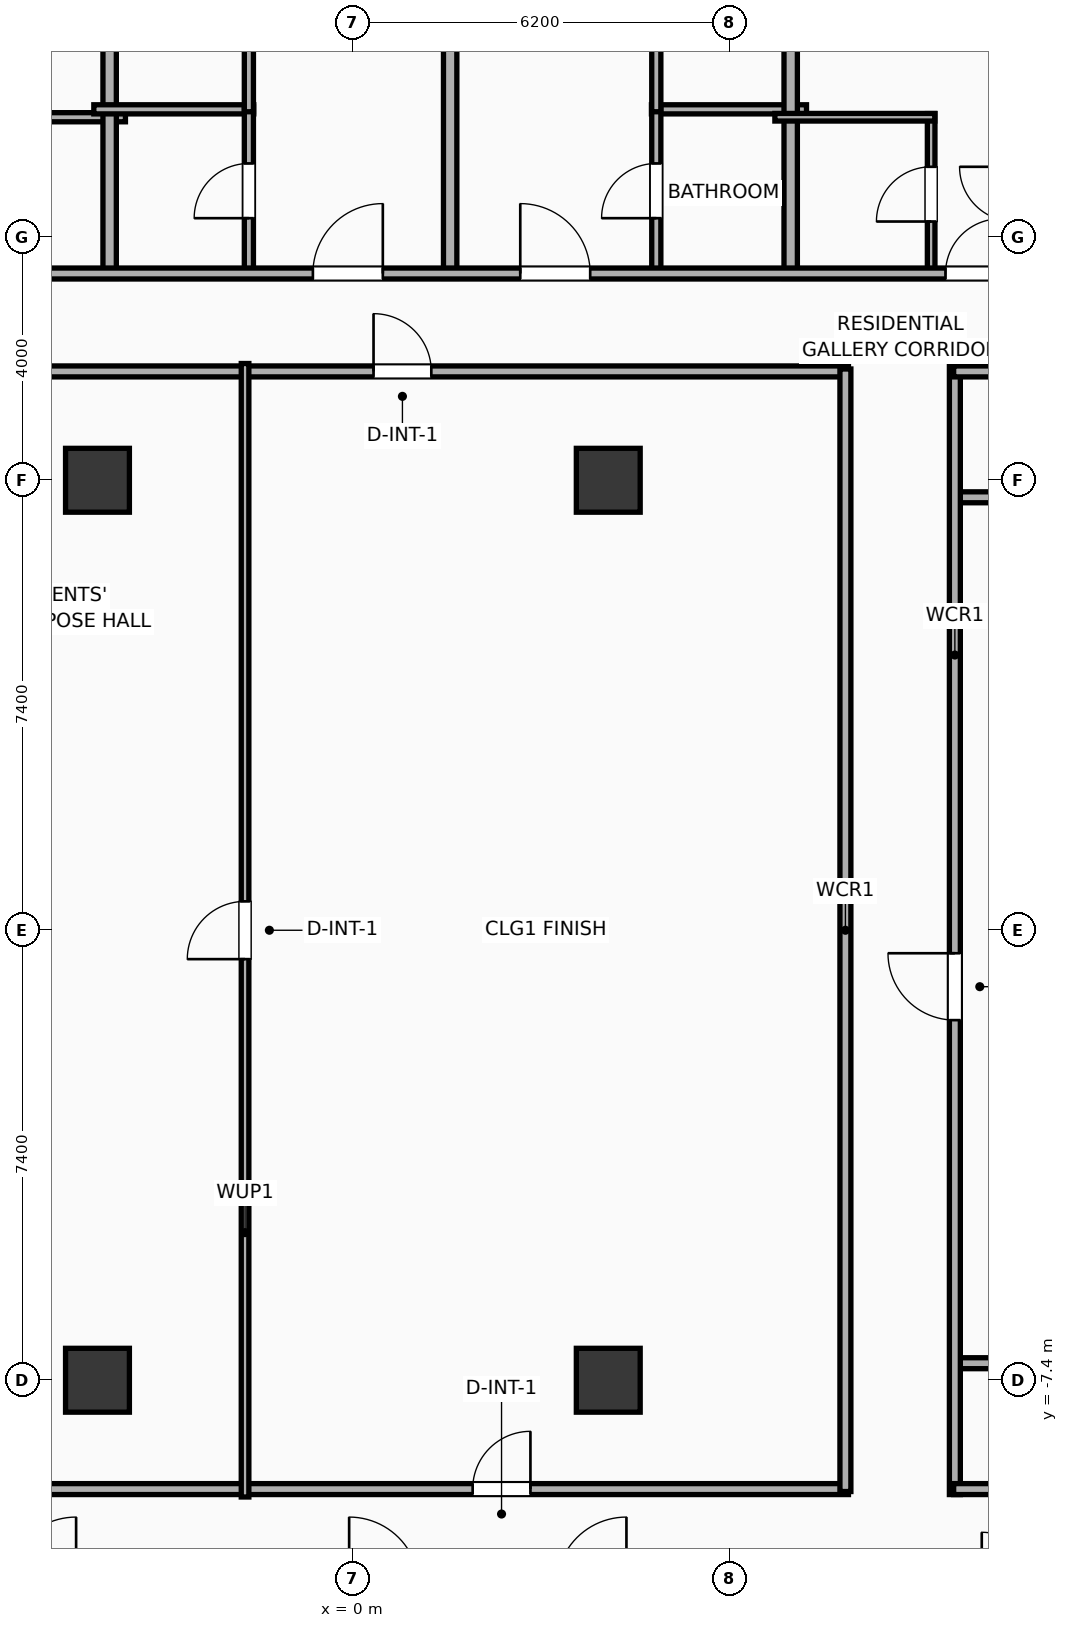
"""IFC4 building model, lengths in metres.
Left out: names, types, materials, properties, quantities, classifications, styles, units other than length and angle.
Written with IfcOpenShell. Run it as: python <this file> out.ifc"""

import sys

from ifc_helpers import new_model, si_unit, direction, frame, frame_2d, origin, origin_2d, place, context, subcontext, project, spatial, rectangle, extrude, element, fill, save


model = new_model("IFC4")
c1 = context("Model", 3, precision=1e-05, world=origin(), true_north=direction((0.0, 1.0)))
c2 = subcontext(c1, "Body", "Model", "MODEL_VIEW")
j1 = project(units=[si_unit("LENGTHUNIT", "METRE"), si_unit("PLANEANGLEUNIT", "RADIAN")], contexts=[c1])
p1 = place(None, origin())
s1 = spatial("IfcSite", under=j1, at=p1, CompositionType="ELEMENT")
p2 = place(p1, origin())
s2 = spatial("IfcBuilding", under=s1, at=p2, CompositionType="ELEMENT")
p3 = place(p2, frame((0.0, 0.0, 29.9)))
s3 = spatial("IfcBuildingStorey", under=s2, at=p3, CompositionType="ELEMENT", Elevation=29.9)
for number, where, z_axis, x_axis in (
    (1, (-4.2, -7.4, 0.0), (0.0, 0.0, 1.0), (1.0, 0.0, 0.0)),
    (2, (-4.2, 7.4, 0.0), (0.0, 0.0, 1.0), (1.0, 0.0, 0.0)),
    (3, (4.2, -7.4, 0.0), (0.0, 0.0, 1.0), (1.0, 0.0, 0.0)),
    (4, (4.2, 7.4, 0.0), (0.0, 0.0, 1.0), (1.0, 0.0, 0.0)),
):
    element("IfcColumn", number, at=place(p3, frame(where, z_axis=z_axis, x_axis=x_axis)), inside=s3, PredefinedType="COLUMN", context=c2, shape_type="SweptSolid", body=[
        extrude(rectangle(XDim=1.05, YDim=1.05, at=origin_2d()), origin(), (0.0, 0.0, 1.0), 3.9),
    ])
for number, where, z_axis, x_axis in (
    (5, (9.88, 7.12, 0.0), (0.0, 0.0, 1.0), (1.0, 0.0, 0.0)),
    (6, (9.88, -7.12, 0.0), (0.0, 0.0, 1.0), (1.0, 0.0, 0.0)),
):
    element("IfcWall", number, at=place(p3, frame(where, z_axis=z_axis, x_axis=x_axis)), inside=s3, PredefinedType="PARTITIONING", context=c2, shape_type="SweptSolid", body=[
        extrude(rectangle(XDim=2.27, YDim=0.18, at=frame_2d((1.135, 0.0))), origin(), (0.0, 0.0, 1.0), 2.94),
    ])
p4 = place(p3, frame((9.9, -9.28, 0.0), z_axis=(0.0, 0.0, 1.0), x_axis=(0.0, 1.0, 0.0)))
e7 = element("IfcWall", 7, at=p4, inside=s3, PredefinedType="PARTITIONING", context=c2, shape_type="SweptSolid", body=[
    extrude(rectangle(XDim=18.56, YDim=0.18, at=frame_2d((9.28, 0.0))), origin(), (0.0, 0.0, 1.0), 3.65),
])
p5 = place(p4, frame((7.802, 0.0, 0.0)))
e8 = element("IfcOpeningElement", 8, at=p5, cuts=e7, PredefinedType="OPENING", context=c2, shape_type="SweptSolid", body=[
    extrude(rectangle(XDim=1.1, YDim=2.05, at=frame_2d((0.55, 1.025))), frame((0.0, 0.1, 0.0), z_axis=(0.0, -1.0, 0.0), x_axis=(1.0, 0.0, 0.0)), (0.0, 0.0, 1.0), 0.2),
])
p6 = place(p3, frame((9.88, 9.19, 0.0), z_axis=(0.0, 0.0, 1.0), x_axis=(1.0, 0.0, 0.0)))
e9 = element("IfcWall", 9, at=p6, inside=s3, PredefinedType="PARTITIONING", context=c2, shape_type="SweptSolid", body=[
    extrude(rectangle(XDim=16.33, YDim=0.18, at=frame_2d((8.165, 0.0))), origin(), (0.0, 0.0, 1.0), 3.65),
])
p7 = place(p6, frame((13.99, 0.0, 0.0)))
e10 = element("IfcOpeningElement", 10, at=p7, cuts=e9, PredefinedType="OPENING", context=c2, shape_type="SweptSolid", body=[
    extrude(rectangle(XDim=0.9, YDim=2.05, at=frame_2d((0.45, 1.025))), frame((0.0, 0.1, 0.0), z_axis=(0.0, -1.0, 0.0), x_axis=(1.0, 0.0, 0.0)), (0.0, 0.0, 1.0), 0.2),
])
p8 = place(p3, frame((9.88, -9.19, 0.0), z_axis=(0.0, 0.0, 1.0), x_axis=(1.0, 0.0, 0.0)))
e11 = element("IfcWall", 11, at=p8, inside=s3, PredefinedType="PARTITIONING", context=c2, shape_type="SweptSolid", body=[
    extrude(rectangle(XDim=16.33, YDim=0.18, at=frame_2d((8.165, 0.0))), origin(), (0.0, 0.0, 1.0), 3.65),
])
p9 = place(p3, frame((-8.15, 9.19, 0.0), z_axis=(0.0, 0.0, 1.0), x_axis=(1.0, 0.0, 0.0)))
e12 = element("IfcWall", 12, at=p9, inside=s3, PredefinedType="PARTITIONING", context=c2, shape_type="SweptSolid", body=[
    extrude(rectangle(XDim=16.3, YDim=0.18, at=frame_2d((8.15, 0.0))), origin(), (0.0, 0.0, 1.0), 3.65),
])
p10 = place(p9, frame((8.49, 0.0, 0.0)))
e13 = element("IfcOpeningElement", 13, at=p10, cuts=e12, PredefinedType="OPENING", context=c2, shape_type="SweptSolid", body=[
    extrude(rectangle(XDim=0.95, YDim=2.05, at=frame_2d((0.475, 1.025))), frame((0.0, 0.1, 0.0), z_axis=(0.0, -1.0, 0.0), x_axis=(1.0, 0.0, 0.0)), (0.0, 0.0, 1.0), 0.2),
])
p11 = place(p3, frame((-8.15, -9.19, 0.0), z_axis=(0.0, 0.0, 1.0), x_axis=(1.0, 0.0, 0.0)))
e14 = element("IfcWall", 14, at=p11, inside=s3, PredefinedType="PARTITIONING", context=c2, shape_type="SweptSolid", body=[
    extrude(rectangle(XDim=16.3, YDim=0.18, at=frame_2d((8.15, 0.0))), origin(), (0.0, 0.0, 1.0), 3.65),
])
p12 = place(p11, frame((1.13, 0.0, 0.0)))
e15 = element("IfcOpeningElement", 15, at=p12, cuts=e14, PredefinedType="OPENING", context=c2, shape_type="SweptSolid", body=[
    extrude(rectangle(XDim=1.0, YDim=2.05, at=frame_2d((0.5, 1.025))), frame((0.0, 0.1, 0.0), z_axis=(0.0, -1.0, 0.0), x_axis=(1.0, 0.0, 0.0)), (0.0, 0.0, 1.0), 0.2),
])
p13 = place(p11, frame((10.12, 0.0, 0.0)))
e16 = element("IfcOpeningElement", 16, at=p13, cuts=e14, PredefinedType="OPENING", context=c2, shape_type="SweptSolid", body=[
    extrude(rectangle(XDim=0.95, YDim=2.05, at=frame_2d((0.475, 1.025))), frame((0.0, 0.1, 0.0), z_axis=(0.0, -1.0, 0.0), x_axis=(1.0, 0.0, 0.0)), (0.0, 0.0, 1.0), 0.2),
])
p14 = place(p3, frame((8.1, -9.23, 0.0), z_axis=(0.0, 0.0, 1.0), x_axis=(0.0, 1.0, 0.0)))
e17 = element("IfcWall", 17, at=p14, inside=s3, PredefinedType="PARTITIONING", context=c2, shape_type="SweptSolid", body=[
    extrude(rectangle(XDim=18.46, YDim=0.18, at=frame_2d((9.23, 0.0))), origin(), (0.0, 0.0, 1.0), 3.65),
])
p15 = place(p3, frame((-1.773, -9.32, 0.0), z_axis=(0.0, 0.0, 1.0), x_axis=(0.0, 1.0, 0.0)))
e18 = element("IfcWall", 18, at=p15, inside=s3, PredefinedType="PARTITIONING", context=c2, shape_type="SweptSolid", body=[
    extrude(rectangle(XDim=18.64, YDim=0.125, at=frame_2d((9.32, 0.0))), origin(), (0.0, 0.0, 1.0), 3.65),
])
p16 = place(p15, frame((8.845, 0.0, 0.0)))
e19 = element("IfcOpeningElement", 19, at=p16, cuts=e18, PredefinedType="OPENING", context=c2, shape_type="SweptSolid", body=[
    extrude(rectangle(XDim=0.95, YDim=2.05, at=frame_2d((0.475, 1.025))), frame((0.0, 0.073, 0.0), z_axis=(0.0, -1.0, 0.0), x_axis=(1.0, 0.0, 0.0)), (0.0, 0.0, 1.0), 0.145),
])
p17 = place(p3, frame((-5.983, 13.37, 0.0), z_axis=(0.0, 0.0, 1.0), x_axis=(1.0, 0.0, 0.0)))
e20 = element("IfcWall", 20, at=p17, inside=s3, PredefinedType="PLUMBINGWALL", context=c2, shape_type="SweptSolid", body=[
    extrude(rectangle(XDim=2.243, YDim=0.15, at=frame_2d((1.122, 0.0))), origin(), (0.0, 0.0, 1.0), 3.65),
])
p18 = place(p3, frame((-4.0, 10.72, 0.0), z_axis=(0.0, 0.0, 1.0), x_axis=(0.0, 1.0, 0.0)))
e21 = element("IfcWall", 21, at=p18, inside=s3, PredefinedType="PARTITIONING", context=c2, shape_type="SweptSolid", body=[
    extrude(rectangle(XDim=11.49, YDim=0.22, at=frame_2d((5.745, 0.0))), origin(), (0.0, 0.0, 1.0), 3.65),
])
p19 = place(p3, frame((-4.26, 13.5, 0.0), z_axis=(0.0, 0.0, 1.0), x_axis=(1.0, 0.0, 0.0)))
e22 = element("IfcWall", 22, at=p19, inside=s3, PredefinedType="PLUMBINGWALL", context=c2, shape_type="SweptSolid", body=[
    extrude(rectangle(XDim=2.63, YDim=0.15, at=frame_2d((1.315, 0.0))), origin(), (0.0, 0.0, 1.0), 3.65),
])
p20 = place(p3, frame((-1.71, 10.78, 0.0), z_axis=(0.0, 0.0, 1.0), x_axis=(0.0, 1.0, 0.0)))
e23 = element("IfcWall", 23, at=p20, inside=s3, PredefinedType="PLUMBINGWALL", context=c2, shape_type="SweptSolid", body=[
    extrude(rectangle(XDim=2.76, YDim=0.15, at=frame_2d((1.38, 0.0))), origin(), (0.0, 0.0, 1.0), 3.65),
])
p21 = place(p20, frame((0.93, 0.0, 0.0)))
e24 = element("IfcOpeningElement", 24, at=p21, cuts=e23, PredefinedType="OPENING", context=c2, shape_type="SweptSolid", body=[
    extrude(rectangle(XDim=0.9, YDim=2.05, at=frame_2d((0.45, 1.025))), frame((0.0, 0.085, 0.0), z_axis=(0.0, -1.0, 0.0), x_axis=(1.0, 0.0, 0.0)), (0.0, 0.0, 1.0), 0.17),
])
p22 = place(p3, frame((-1.71, 13.46, 0.0), z_axis=(0.0, 0.0, 1.0), x_axis=(0.0, 1.0, 0.0)))
e25 = element("IfcWall", 25, at=p22, inside=s3, PredefinedType="PLUMBINGWALL", context=c2, shape_type="SweptSolid", body=[
    extrude(rectangle(XDim=8.798, YDim=0.15, at=frame_2d((4.399, 0.0))), origin(), (0.0, 0.0, 1.0), 3.65),
])
p23 = place(p22, frame((3.949, 0.0, 0.0)))
e26 = element("IfcOpeningElement", 26, at=p23, cuts=e25, PredefinedType="OPENING", context=c2, shape_type="SweptSolid", body=[
    extrude(rectangle(XDim=0.9, YDim=2.05, at=frame_2d((0.45, 1.025))), frame((0.0, 0.085, 0.0), z_axis=(0.0, -1.0, 0.0), x_axis=(1.0, 0.0, 0.0)), (0.0, 0.0, 1.0), 0.17),
])
p24 = place(p3, frame((1.6, 10.72, 0.0), z_axis=(0.0, 0.0, 1.0), x_axis=(0.0, 1.0, 0.0)))
e27 = element("IfcWall", 27, at=p24, inside=s3, PredefinedType="PARTITIONING", context=c2, shape_type="SweptSolid", body=[
    extrude(rectangle(XDim=11.49, YDim=0.22, at=frame_2d((5.745, 0.0))), origin(), (0.0, 0.0, 1.0), 2.54),
])
p25 = place(p3, frame((4.91, 13.5, 0.0), z_axis=(0.0, 0.0, 1.0), x_axis=(1.0, 0.0, 0.0)))
e28 = element("IfcWall", 28, at=p25, inside=s3, PredefinedType="PLUMBINGWALL", context=c2, shape_type="SweptSolid", body=[
    extrude(rectangle(XDim=2.55, YDim=0.15, at=frame_2d((1.275, 0.0))), origin(), (0.0, 0.0, 1.0), 3.65),
])
p26 = place(p3, frame((4.99, 10.78, 0.0), z_axis=(0.0, 0.0, 1.0), x_axis=(0.0, 1.0, 0.0)))
e29 = element("IfcWall", 29, at=p26, inside=s3, PredefinedType="PLUMBINGWALL", context=c2, shape_type="SweptSolid", body=[
    extrude(rectangle(XDim=2.76, YDim=0.15, at=frame_2d((1.38, 0.0))), origin(), (0.0, 0.0, 1.0), 3.65),
])
p27 = place(p26, frame((0.93, 0.0, 0.0)))
e30 = element("IfcOpeningElement", 30, at=p27, cuts=e29, PredefinedType="OPENING", context=c2, shape_type="SweptSolid", body=[
    extrude(rectangle(XDim=0.9, YDim=2.05, at=frame_2d((0.45, 1.025))), frame((0.0, 0.085, 0.0), z_axis=(0.0, -1.0, 0.0), x_axis=(1.0, 0.0, 0.0)), (0.0, 0.0, 1.0), 0.17),
])
p28 = place(p3, frame((4.99, 13.46, 0.0), z_axis=(0.0, 0.0, 1.0), x_axis=(0.0, 1.0, 0.0)))
e31 = element("IfcWall", 31, at=p28, inside=s3, PredefinedType="PLUMBINGWALL", context=c2, shape_type="SweptSolid", body=[
    extrude(rectangle(XDim=8.798, YDim=0.15, at=frame_2d((4.399, 0.0))), origin(), (0.0, 0.0, 1.0), 3.65),
])
p29 = place(p28, frame((3.949, 0.0, 0.0)))
e32 = element("IfcOpeningElement", 32, at=p29, cuts=e31, PredefinedType="OPENING", context=c2, shape_type="SweptSolid", body=[
    extrude(rectangle(XDim=0.9, YDim=2.05, at=frame_2d((0.45, 1.025))), frame((0.0, 0.085, 0.0), z_axis=(0.0, -1.0, 0.0), x_axis=(1.0, 0.0, 0.0)), (0.0, 0.0, 1.0), 0.17),
])
p30 = place(p3, frame((7.2, 10.72, 0.0), z_axis=(0.0, 0.0, 1.0), x_axis=(0.0, 1.0, 0.0)))
e33 = element("IfcWall", 33, at=p30, inside=s3, PredefinedType="PARTITIONING", context=c2, shape_type="SweptSolid", body=[
    extrude(rectangle(XDim=11.49, YDim=0.22, at=frame_2d((5.745, 0.0))), origin(), (0.0, 0.0, 1.0), 3.65),
])
p31 = place(p3, frame((9.51, 10.78, 0.0), z_axis=(0.0, 0.0, 1.0), x_axis=(0.0, 1.0, 0.0)))
e34 = element("IfcWall", 34, at=p31, inside=s3, PredefinedType="PARTITIONING", context=c2, shape_type="SweptSolid", body=[
    extrude(rectangle(XDim=2.65, YDim=0.125, at=frame_2d((1.325, 0.0))), origin(), (0.0, 0.0, 1.0), 3.65),
])
p32 = place(p31, frame((0.875, 0.0, 0.0)))
e35 = element("IfcOpeningElement", 35, at=p32, cuts=e34, PredefinedType="OPENING", context=c2, shape_type="SweptSolid", body=[
    extrude(rectangle(XDim=0.9, YDim=2.05, at=frame_2d((0.45, 1.025))), frame((0.0, 0.073, 0.0), z_axis=(0.0, -1.0, 0.0), x_axis=(1.0, 0.0, 0.0)), (0.0, 0.0, 1.0), 0.145),
])
p33 = place(p3, frame((6.94, 13.37, 0.0), z_axis=(0.0, 0.0, 1.0), x_axis=(1.0, 0.0, 0.0)))
e36 = element("IfcWall", 36, at=p33, inside=s3, PredefinedType="PARTITIONING", context=c2, shape_type="SweptSolid", body=[
    extrude(rectangle(XDim=2.63, YDim=0.125, at=frame_2d((1.315, 0.0))), origin(), (0.0, 0.0, 1.0), 3.65),
])
p34 = place(p3, frame((-33.41, 10.8, 0.0), z_axis=(0.0, 0.0, 1.0), x_axis=(1.0, 0.0, 0.0)))
e37 = element("IfcWall", 37, at=p34, inside=s3, PredefinedType="PARTITIONING", context=c2, shape_type="SweptSolid", body=[
    extrude(rectangle(XDim=59.62, YDim=0.18, at=frame_2d((29.81, 0.0))), origin(), (0.0, 0.0, 1.0), 3.65),
])
p35 = place(p34, frame((3.062, 0.0, 0.0)))
e38 = element("IfcOpeningElement", 38, at=p35, cuts=e37, PredefinedType="OPENING", context=c2, shape_type="SweptSolid", body=[
    extrude(rectangle(XDim=1.15, YDim=2.05, at=frame_2d((0.575, 1.025))), frame((0.0, 0.1, 0.0), z_axis=(0.0, -1.0, 0.0), x_axis=(1.0, 0.0, 0.0)), (0.0, 0.0, 1.0), 0.2),
])
p36 = place(p34, frame((10.312, 0.0, 0.0)))
e39 = element("IfcOpeningElement", 39, at=p36, cuts=e37, PredefinedType="OPENING", context=c2, shape_type="SweptSolid", body=[
    extrude(rectangle(XDim=1.15, YDim=2.05, at=frame_2d((0.575, 1.025))), frame((0.0, 0.1, 0.0), z_axis=(0.0, -1.0, 0.0), x_axis=(1.0, 0.0, 0.0)), (0.0, 0.0, 1.0), 0.2),
])
p37 = place(p34, frame((15.153, 0.0, 0.0)))
e40 = element("IfcOpeningElement", 40, at=p37, cuts=e37, PredefinedType="OPENING", context=c2, shape_type="SweptSolid", body=[
    extrude(rectangle(XDim=0.9, YDim=2.05, at=frame_2d((0.45, 1.025))), frame((0.0, 0.1, 0.0), z_axis=(0.0, -1.0, 0.0), x_axis=(1.0, 0.0, 0.0)), (0.0, 0.0, 1.0), 0.2),
])
p38 = place(p34, frame((21.508, 0.0, 0.0)))
e41 = element("IfcOpeningElement", 41, at=p38, cuts=e37, PredefinedType="OPENING", context=c2, shape_type="SweptSolid", body=[
    extrude(rectangle(XDim=1.15, YDim=2.05, at=frame_2d((0.575, 1.025))), frame((0.0, 0.1, 0.0), z_axis=(0.0, -1.0, 0.0), x_axis=(1.0, 0.0, 0.0)), (0.0, 0.0, 1.0), 0.2),
])
p39 = place(p34, frame((26.355, 0.0, 0.0)))
e42 = element("IfcOpeningElement", 42, at=p39, cuts=e37, PredefinedType="OPENING", context=c2, shape_type="SweptSolid", body=[
    extrude(rectangle(XDim=0.9, YDim=2.05, at=frame_2d((0.45, 1.025))), frame((0.0, 0.1, 0.0), z_axis=(0.0, -1.0, 0.0), x_axis=(1.0, 0.0, 0.0)), (0.0, 0.0, 1.0), 0.2),
])
p40 = place(p34, frame((32.753, 0.0, 0.0)))
e43 = element("IfcOpeningElement", 43, at=p40, cuts=e37, PredefinedType="OPENING", context=c2, shape_type="SweptSolid", body=[
    extrude(rectangle(XDim=1.15, YDim=2.05, at=frame_2d((0.575, 1.025))), frame((0.0, 0.1, 0.0), z_axis=(0.0, -1.0, 0.0), x_axis=(1.0, 0.0, 0.0)), (0.0, 0.0, 1.0), 0.2),
])
p41 = place(p34, frame((36.163, 0.0, 0.0)))
e44 = element("IfcOpeningElement", 44, at=p41, cuts=e37, PredefinedType="OPENING", context=c2, shape_type="SweptSolid", body=[
    extrude(rectangle(XDim=1.15, YDim=2.05, at=frame_2d((0.575, 1.025))), frame((0.0, 0.1, 0.0), z_axis=(0.0, -1.0, 0.0), x_axis=(1.0, 0.0, 0.0)), (0.0, 0.0, 1.0), 0.2),
])
p42 = place(p34, frame((43.156, 0.0, 0.0)))
e45 = element("IfcOpeningElement", 45, at=p42, cuts=e37, PredefinedType="OPENING", context=c2, shape_type="SweptSolid", body=[
    extrude(rectangle(XDim=0.9, YDim=2.05, at=frame_2d((0.45, 1.025))), frame((0.0, 0.1, 0.0), z_axis=(0.0, -1.0, 0.0), x_axis=(1.0, 0.0, 0.0)), (0.0, 0.0, 1.0), 0.2),
])
p43 = place(p34, frame((47.36, 0.0, 0.0)))
e46 = element("IfcOpeningElement", 46, at=p43, cuts=e37, PredefinedType="OPENING", context=c2, shape_type="SweptSolid", body=[
    extrude(rectangle(XDim=1.15, YDim=2.05, at=frame_2d((0.575, 1.025))), frame((0.0, 0.1, 0.0), z_axis=(0.0, -1.0, 0.0), x_axis=(1.0, 0.0, 0.0)), (0.0, 0.0, 1.0), 0.2),
])
p44 = place(p34, frame((55.337, 0.0, 0.0)))
e47 = element("IfcOpeningElement", 47, at=p44, cuts=e37, PredefinedType="OPENING", context=c2, shape_type="SweptSolid", body=[
    extrude(rectangle(XDim=1.15, YDim=2.05, at=frame_2d((0.575, 1.025))), frame((0.0, 0.1, 0.0), z_axis=(0.0, -1.0, 0.0), x_axis=(1.0, 0.0, 0.0)), (0.0, 0.0, 1.0), 0.2),
])
p45 = place(p5, origin())
e48 = element("IfcDoor", 48, at=p45, inside=s3, OperationType="SINGLE_SWING_RIGHT", PredefinedType="DOOR", context=c2, shape_type="SweptSolid", body=[
    extrude(rectangle(XDim=1.1, YDim=2.05, at=frame_2d((0.55, 1.025))), frame((0.0, 0.025, 0.0), z_axis=(0.0, -1.0, 0.0), x_axis=(1.0, 0.0, 0.0)), (0.0, 0.0, 1.0), 0.05),
])
fill(e8, e48)
p46 = place(p10, origin())
e49 = element("IfcDoor", 49, at=p46, inside=s3, OperationType="SINGLE_SWING_LEFT", PredefinedType="DOOR", context=c2, shape_type="SweptSolid", body=[
    extrude(rectangle(XDim=0.95, YDim=2.05, at=frame_2d((0.475, 1.025))), frame((0.0, 0.025, 0.0), z_axis=(0.0, -1.0, 0.0), x_axis=(1.0, 0.0, 0.0)), (0.0, 0.0, 1.0), 0.05),
])
fill(e13, e49)
p47 = place(p13, origin())
e50 = element("IfcDoor", 50, at=p47, inside=s3, OperationType="SINGLE_SWING_RIGHT", PredefinedType="DOOR", context=c2, shape_type="SweptSolid", body=[
    extrude(rectangle(XDim=0.95, YDim=2.05, at=frame_2d((0.475, 1.025))), frame((0.0, 0.025, 0.0), z_axis=(0.0, -1.0, 0.0), x_axis=(1.0, 0.0, 0.0)), (0.0, 0.0, 1.0), 0.05),
])
fill(e16, e50)
p48 = place(p16, origin())
e51 = element("IfcDoor", 51, at=p48, inside=s3, OperationType="SINGLE_SWING_LEFT", PredefinedType="DOOR", context=c2, shape_type="SweptSolid", body=[
    extrude(rectangle(XDim=0.95, YDim=2.05, at=frame_2d((0.475, 1.025))), frame((0.0, 0.025, 0.0), z_axis=(0.0, -1.0, 0.0), x_axis=(1.0, 0.0, 0.0)), (0.0, 0.0, 1.0), 0.05),
])
fill(e19, e51)
p49 = place(p21, origin())
e52 = element("IfcDoor", 52, at=p49, inside=s3, OperationType="SINGLE_SWING_LEFT", PredefinedType="DOOR", context=c2, shape_type="SweptSolid", body=[
    extrude(rectangle(XDim=0.9, YDim=2.05, at=frame_2d((0.45, 1.025))), frame((0.0, 0.025, 0.0), z_axis=(0.0, -1.0, 0.0), x_axis=(1.0, 0.0, 0.0)), (0.0, 0.0, 1.0), 0.05),
])
fill(e24, e52)
p50 = place(p27, origin())
e53 = element("IfcDoor", 53, at=p50, inside=s3, OperationType="SINGLE_SWING_LEFT", PredefinedType="DOOR", context=c2, shape_type="SweptSolid", body=[
    extrude(rectangle(XDim=0.9, YDim=2.05, at=frame_2d((0.45, 1.025))), frame((0.0, 0.025, 0.0), z_axis=(0.0, -1.0, 0.0), x_axis=(1.0, 0.0, 0.0)), (0.0, 0.0, 1.0), 0.05),
])
fill(e30, e53)
p51 = place(p32, origin())
e54 = element("IfcDoor", 54, at=p51, inside=s3, OperationType="SINGLE_SWING_LEFT", PredefinedType="DOOR", context=c2, shape_type="SweptSolid", body=[
    extrude(rectangle(XDim=0.9, YDim=2.05, at=frame_2d((0.45, 1.025))), frame((0.0, 0.025, 0.0), z_axis=(0.0, -1.0, 0.0), x_axis=(1.0, 0.0, 0.0)), (0.0, 0.0, 1.0), 0.05),
])
fill(e35, e54)
p52 = place(p40, origin())
e55 = element("IfcDoor", 55, at=p52, inside=s3, OperationType="SINGLE_SWING_RIGHT", PredefinedType="DOOR", context=c2, shape_type="SweptSolid", body=[
    extrude(rectangle(XDim=1.15, YDim=2.05, at=frame_2d((0.575, 1.025))), frame((0.0, 0.025, 0.0), z_axis=(0.0, -1.0, 0.0), x_axis=(1.0, 0.0, 0.0)), (0.0, 0.0, 1.0), 0.05),
])
fill(e43, e55)
p53 = place(p41, origin())
e56 = element("IfcDoor", 56, at=p53, inside=s3, OperationType="SINGLE_SWING_LEFT", PredefinedType="DOOR", context=c2, shape_type="SweptSolid", body=[
    extrude(rectangle(XDim=1.15, YDim=2.05, at=frame_2d((0.575, 1.025))), frame((0.0, 0.025, 0.0), z_axis=(0.0, -1.0, 0.0), x_axis=(1.0, 0.0, 0.0)), (0.0, 0.0, 1.0), 0.05),
])
fill(e44, e56)
p54 = place(p42, origin())
e57 = element("IfcDoor", 57, at=p54, inside=s3, OperationType="SINGLE_SWING_RIGHT", PredefinedType="DOOR", context=c2, shape_type="SweptSolid", body=[
    extrude(rectangle(XDim=0.9, YDim=2.05, at=frame_2d((0.45, 1.025))), frame((0.0, 0.025, 0.0), z_axis=(0.0, -1.0, 0.0), x_axis=(1.0, 0.0, 0.0)), (0.0, 0.0, 1.0), 0.05),
])
fill(e45, e57)
save(model, sys.argv[1])
